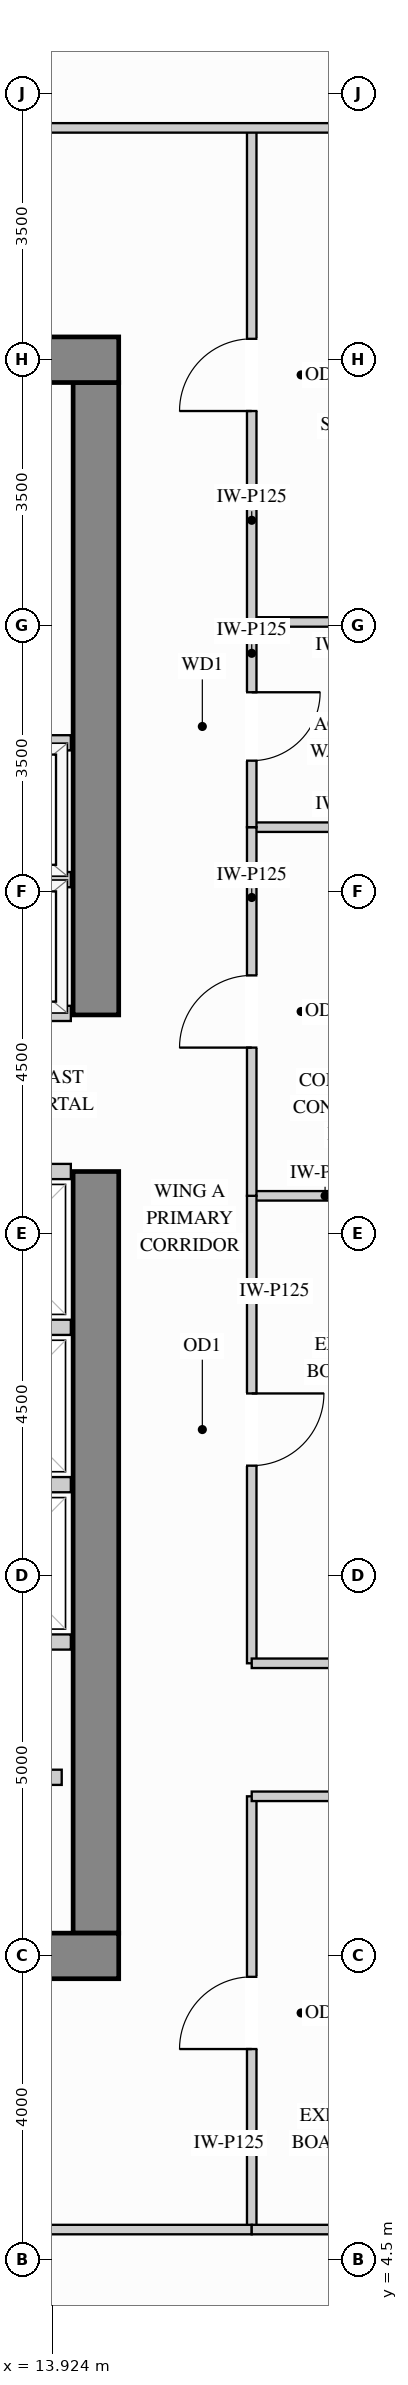
"""IFC4 building model, lengths in metres.
Left out: names, types, materials, properties, quantities, classifications, styles, units other than length and angle.
Written with IfcOpenShell. Run it as: python <this file> out.ifc"""

import sys

from ifc_helpers import new_model, si_unit, direction, frame, frame_2d, origin, place, context, subcontext, project, spatial, rectangle, extrude, source, transform, mapped, element, fill, save


model = new_model("IFC4")
c1 = context("Model", 3, precision=1e-05, world=origin(), true_north=direction((0.0, 1.0)))
c2 = subcontext(c1, "Body", "Model", "MODEL_VIEW")
j1 = project(units=[si_unit("LENGTHUNIT", "METRE"), si_unit("PLANEANGLEUNIT", "RADIAN")], contexts=[c1])
p1 = place(None, origin())
s1 = spatial("IfcSite", under=j1, at=p1, CompositionType="ELEMENT")
p2 = place(p1, origin())
s2 = spatial("IfcBuilding", under=s1, at=p2, CompositionType="ELEMENT")
p3 = place(p2, frame((0.0, 0.0, 153.9)))
s3 = spatial("IfcBuildingStorey", under=s2, at=p3, CompositionType="ELEMENT", Elevation=153.9)
m1 = source(origin(), c2, "Body", "SweptSolid", [
    extrude(rectangle(XDim=10.02, YDim=0.6, at=frame_2d((5.01, 0.0))), origin(), (0.0, 0.0, 1.0), 3.4),
])
p4 = place(p3, frame((14.5, 8.8, 0.0), z_axis=(0.0, 0.0, 1.0), x_axis=(0.0, 1.0, 0.0)))
e1 = element("IfcWall", 1, at=p4, inside=s3, PredefinedType="SHEAR", context=c2, shape_type="MappedRepresentation", body=[
    mapped(m1, transform((0.0, 0.0, 0.0), x_axis=(1.0, 0.0, 0.0), y_axis=(0.0, 1.0, 0.0), z_axis=(0.0, 0.0, 1.0))),
])
m2 = source(origin(), c2, "Body", "SweptSolid", [
    extrude(rectangle(XDim=8.32, YDim=0.6, at=frame_2d((4.16, 0.0))), origin(), (0.0, 0.0, 1.0), 3.4),
])
p5 = place(p3, frame((14.5, 20.88, 0.0), z_axis=(0.0, 0.0, 1.0), x_axis=(0.0, 1.0, 0.0)))
e2 = element("IfcWall", 2, at=p5, inside=s3, PredefinedType="SHEAR", context=c2, shape_type="MappedRepresentation", body=[
    mapped(m2, transform((0.0, 0.0, 0.0), x_axis=(1.0, 0.0, 0.0), y_axis=(0.0, 1.0, 0.0), z_axis=(0.0, 0.0, 1.0))),
])
m3 = source(origin(), c2, "Body", "SweptSolid", [
    extrude(rectangle(XDim=10.6, YDim=0.6, at=frame_2d((5.3, 0.0))), origin(), (0.0, 0.0, 1.0), 3.4),
])
for number, where, z_axis, x_axis in (
    (3, (4.2, 29.5, 0.0), (0.0, 0.0, 1.0), (1.0, 0.0, 0.0)),
    (4, (4.2, 8.5, 0.0), (0.0, 0.0, 1.0), (1.0, 0.0, 0.0)),
):
    element("IfcWall", number, at=place(p3, frame(where, z_axis=z_axis, x_axis=x_axis)), inside=s3, PredefinedType="SHEAR", context=c2, shape_type="MappedRepresentation", body=[
        mapped(m3, transform((0.0, 0.0, 0.0), x_axis=(1.0, 0.0, 0.0), y_axis=(0.0, 1.0, 0.0), z_axis=(0.0, 0.0, 1.0))),
    ])
m4 = source(origin(), c2, "Body", "SweptSolid", [
    extrude(rectangle(XDim=1.93, YDim=0.125, at=frame_2d((0.965, 0.0))), origin(), (0.0, 0.0, 1.0), 3.385),
])
p6 = place(p3, frame((16.55, 18.5, 0.0), z_axis=(0.0, 0.0, 1.0), x_axis=(1.0, 0.0, 0.0)))
e5 = element("IfcWall", 5, at=p6, inside=s3, PredefinedType="PARTITIONING", context=c2, shape_type="MappedRepresentation", body=[
    mapped(m4, transform((0.0, 0.0, 0.0), x_axis=(1.0, 0.0, 0.0), y_axis=(0.0, 1.0, 0.0), z_axis=(0.0, 0.0, 1.0))),
])
m5 = source(origin(), c2, "Body", "SweptSolid", [
    extrude(rectangle(XDim=2.598, YDim=0.125, at=frame_2d((1.299, 0.0))), origin(), (0.0, 0.0, 1.0), 3.385),
])
for number, where, z_axis, x_axis in (
    (6, (16.55, 23.35, 0.0), (0.0, 0.0, 1.0), (1.0, 0.0, 0.0)),
    (7, (16.55, 26.05, 0.0), (0.0, 0.0, 1.0), (1.0, 0.0, 0.0)),
):
    element("IfcWall", number, at=place(p3, frame(where, z_axis=z_axis, x_axis=x_axis)), inside=s3, PredefinedType="PARTITIONING", context=c2, shape_type="MappedRepresentation", body=[
        mapped(m5, transform((0.0, 0.0, 0.0), x_axis=(1.0, 0.0, 0.0), y_axis=(0.0, 1.0, 0.0), z_axis=(0.0, 0.0, 1.0))),
    ])
p7 = place(p3, frame((16.55, 12.35, 0.0), z_axis=(0.0, 0.0, 1.0), x_axis=(0.0, 1.0, 0.0)))
e8 = element("IfcWall", 8, at=p7, inside=s3, PredefinedType="PARTITIONING", context=c2, shape_type="SweptSolid", body=[
    extrude(rectangle(XDim=6.15, YDim=0.125, at=frame_2d((3.075, 0.0))), origin(), (0.0, 0.0, 1.0), 3.385),
])
p8 = place(p7, frame((2.6, 0.0, 0.0)))
e9 = element("IfcOpeningElement", 9, at=p8, cuts=e8, PredefinedType="OPENING", context=c2, shape_type="SweptSolid", body=[
    extrude(rectangle(XDim=0.95, YDim=2.15, at=frame_2d((0.475, 1.075))), frame((0.0, 0.073, 0.0), z_axis=(0.0, -1.0, 0.0), x_axis=(1.0, 0.0, 0.0)), (0.0, 0.0, 1.0), 0.145),
])
p9 = place(p3, frame((16.55, 18.5, 0.0), z_axis=(0.0, 0.0, 1.0), x_axis=(0.0, 1.0, 0.0)))
e10 = element("IfcWall", 10, at=p9, inside=s3, PredefinedType="PARTITIONING", context=c2, shape_type="SweptSolid", body=[
    extrude(rectangle(XDim=4.85, YDim=0.125, at=frame_2d((2.425, 0.0))), origin(), (0.0, 0.0, 1.0), 3.385),
])
p10 = place(p9, frame((1.95, 0.0, 0.0)))
e11 = element("IfcOpeningElement", 11, at=p10, cuts=e10, PredefinedType="OPENING", context=c2, shape_type="SweptSolid", body=[
    extrude(rectangle(XDim=0.95, YDim=2.15, at=frame_2d((0.475, 1.075))), frame((0.0, 0.073, 0.0), z_axis=(0.0, -1.0, 0.0), x_axis=(1.0, 0.0, 0.0)), (0.0, 0.0, 1.0), 0.145),
])
p11 = place(p3, frame((16.55, 26.05, 0.0), z_axis=(0.0, 0.0, 1.0), x_axis=(0.0, 1.0, 0.0)))
e12 = element("IfcWall", 12, at=p11, inside=s3, PredefinedType="PARTITIONING", context=c2, shape_type="SweptSolid", body=[
    extrude(rectangle(XDim=6.5, YDim=0.125, at=frame_2d((3.25, 0.0))), origin(), (0.0, 0.0, 1.0), 3.385),
])
p12 = place(p11, frame((2.775, 0.0, 0.0)))
e13 = element("IfcOpeningElement", 13, at=p12, cuts=e12, PredefinedType="OPENING", context=c2, shape_type="SweptSolid", body=[
    extrude(rectangle(XDim=0.95, YDim=2.15, at=frame_2d((0.475, 1.075))), frame((0.0, 0.073, 0.0), z_axis=(0.0, -1.0, 0.0), x_axis=(1.0, 0.0, 0.0)), (0.0, 0.0, 1.0), 0.145),
])
p13 = place(p3, frame((16.55, 4.9, 0.0), z_axis=(0.0, 0.0, 1.0), x_axis=(0.0, 1.0, 0.0)))
e14 = element("IfcWall", 14, at=p13, inside=s3, PredefinedType="PARTITIONING", context=c2, shape_type="SweptSolid", body=[
    extrude(rectangle(XDim=5.7, YDim=0.125, at=frame_2d((2.85, 0.0))), origin(), (0.0, 0.0, 1.0), 3.385),
])
p14 = place(p13, frame((2.375, 0.0, 0.0)))
e15 = element("IfcOpeningElement", 15, at=p14, cuts=e14, PredefinedType="OPENING", context=c2, shape_type="SweptSolid", body=[
    extrude(rectangle(XDim=0.95, YDim=2.15, at=frame_2d((0.475, 1.075))), frame((0.0, 0.073, 0.0), z_axis=(0.0, -1.0, 0.0), x_axis=(1.0, 0.0, 0.0)), (0.0, 0.0, 1.0), 0.145),
])
p15 = place(p3, frame((16.55, 23.35, 0.0), z_axis=(0.0, 0.0, 1.0), x_axis=(0.0, 1.0, 0.0)))
e16 = element("IfcWall", 16, at=p15, inside=s3, PredefinedType="PARTITIONING", context=c2, shape_type="SweptSolid", body=[
    extrude(rectangle(XDim=2.7, YDim=0.125, at=frame_2d((1.35, 0.0))), origin(), (0.0, 0.0, 1.0), 3.385),
])
p16 = place(p15, frame((0.875, 0.0, 0.0)))
e17 = element("IfcOpeningElement", 17, at=p16, cuts=e16, PredefinedType="OPENING", context=c2, shape_type="SweptSolid", body=[
    extrude(rectangle(XDim=0.9, YDim=2.15, at=frame_2d((0.45, 1.075))), frame((0.0, 0.073, 0.0), z_axis=(0.0, -1.0, 0.0), x_axis=(1.0, 0.0, 0.0)), (0.0, 0.0, 1.0), 0.145),
])
m6 = source(origin(), c2, "Body", "SweptSolid", [
    extrude(rectangle(XDim=7.498, YDim=0.125, at=frame_2d((3.749, 0.0))), origin(), (0.0, 0.0, 1.0), 3.385),
])
p17 = place(p3, frame((11.65, 32.55, 0.0), z_axis=(0.0, 0.0, 1.0), x_axis=(1.0, 0.0, 0.0)))
e18 = element("IfcWall", 18, at=p17, inside=s3, PredefinedType="PARTITIONING", context=c2, shape_type="MappedRepresentation", body=[
    mapped(m6, transform((0.0, 0.0, 0.0), x_axis=(1.0, 0.0, 0.0), y_axis=(0.0, 1.0, 0.0), z_axis=(0.0, 0.0, 1.0))),
])
m7 = source(origin(), c2, "Body", "SweptSolid", [
    extrude(rectangle(XDim=2.95, YDim=0.125, at=frame_2d((1.475, 0.0))), origin(), (0.0, 0.0, 1.0), 3.385),
])
for number, where, z_axis, x_axis in (
    (19, (16.55, 12.35, 0.0), (0.0, 0.0, 1.0), (1.0, 0.0, 0.0)),
    (20, (16.55, 10.6, 0.0), (0.0, 0.0, 1.0), (1.0, 0.0, 0.0)),
):
    element("IfcWall", number, at=place(p3, frame(where, z_axis=z_axis, x_axis=x_axis)), inside=s3, PredefinedType="PARTITIONING", context=c2, shape_type="MappedRepresentation", body=[
        mapped(m7, transform((0.0, 0.0, 0.0), x_axis=(1.0, 0.0, 0.0), y_axis=(0.0, 1.0, 0.0), z_axis=(0.0, 0.0, 1.0))),
    ])
p18 = place(p3, frame((10.213, 4.9, 0.0), z_axis=(0.0, 0.0, 1.0), x_axis=(1.0, 0.0, 0.0)))
e21 = element("IfcWall", 21, at=p18, inside=s3, PredefinedType="PARTITIONING", context=c2, shape_type="SweptSolid", body=[
    extrude(rectangle(XDim=6.337, YDim=0.125, at=frame_2d((3.168, 0.0))), origin(), (0.0, 0.0, 1.0), 2.848),
])
p19 = place(p18, frame((2.694, 0.0, 0.0)))
e22 = element("IfcOpeningElement", 22, at=p19, cuts=e21, PredefinedType="OPENING", context=c2, shape_type="SweptSolid", body=[
    extrude(rectangle(XDim=0.95, YDim=2.15, at=frame_2d((0.475, 1.075))), frame((0.0, 0.073, 0.0), z_axis=(0.0, -1.0, 0.0), x_axis=(1.0, 0.0, 0.0)), (0.0, 0.0, 1.0), 0.145),
])
m8 = source(origin(), c2, "Body", "SweptSolid", [
    extrude(rectangle(XDim=2.598, YDim=0.125, at=frame_2d((1.299, 0.0))), origin(), (0.0, 0.0, 1.0), 2.848),
])
p20 = place(p3, frame((16.55, 4.9, 0.0), z_axis=(0.0, 0.0, 1.0), x_axis=(1.0, 0.0, 0.0)))
e23 = element("IfcWall", 23, at=p20, inside=s3, PredefinedType="PARTITIONING", context=c2, shape_type="MappedRepresentation", body=[
    mapped(m8, transform((0.0, 0.0, 0.0), x_axis=(1.0, 0.0, 0.0), y_axis=(0.0, 1.0, 0.0), z_axis=(0.0, 0.0, 1.0))),
])
m9 = source(origin(), c2, "Body", "SweptSolid", [
    extrude(rectangle(XDim=1.63, YDim=0.2, at=frame_2d((0.815, 0.0))), origin(), (0.0, 0.0, 1.0), 3.385),
])
p21 = place(p3, frame((12.42, 10.85, 0.0), z_axis=(0.0, 0.0, 1.0), x_axis=(1.0, 0.0, 0.0)))
e24 = element("IfcWall", 24, at=p21, inside=s3, PredefinedType="PARTITIONING", context=c2, shape_type="MappedRepresentation", body=[
    mapped(m9, transform((0.0, 0.0, 0.0), x_axis=(1.0, 0.0, 0.0), y_axis=(0.0, 1.0, 0.0), z_axis=(0.0, 0.0, 1.0))),
])
m10 = source(origin(), c2, "Body", "SweptSolid", [
    extrude(rectangle(XDim=2.34, YDim=0.2, at=frame_2d((1.17, 0.0))), origin(), (0.0, 0.0, 1.0), 3.385),
])
for number, where, z_axis, x_axis in (
    (25, (11.83, 22.66, 0.0), (0.0, 0.0, 1.0), (1.0, 0.0, 0.0)),
    (26, (11.83, 20.9, 0.0), (0.0, 0.0, 1.0), (1.0, 0.0, 0.0)),
    (27, (11.83, 24.46, 0.0), (0.0, 0.0, 1.0), (1.0, 0.0, 0.0)),
):
    element("IfcWall", number, at=place(p3, frame(where, z_axis=z_axis, x_axis=x_axis)), inside=s3, PredefinedType="PARTITIONING", context=c2, shape_type="MappedRepresentation", body=[
        mapped(m10, transform((0.0, 0.0, 0.0), x_axis=(1.0, 0.0, 0.0), y_axis=(0.0, 1.0, 0.0), z_axis=(0.0, 0.0, 1.0))),
    ])
m11 = source(origin(), c2, "Body", "SweptSolid", [
    extrude(rectangle(XDim=1.94, YDim=0.2, at=frame_2d((0.97, 0.0))), origin(), (0.0, 0.0, 1.0), 3.385),
])
for number, where, z_axis, x_axis in (
    (28, (12.23, 14.7, 0.0), (0.0, 0.0, 1.0), (1.0, 0.0, 0.0)),
    (29, (12.23, 12.63, 0.0), (0.0, 0.0, 1.0), (1.0, 0.0, 0.0)),
    (30, (12.23, 16.77, 0.0), (0.0, 0.0, 1.0), (1.0, 0.0, 0.0)),
    (31, (12.23, 18.82, 0.0), (0.0, 0.0, 1.0), (1.0, 0.0, 0.0)),
):
    element("IfcWall", number, at=place(p3, frame(where, z_axis=z_axis, x_axis=x_axis)), inside=s3, PredefinedType="PARTITIONING", context=c2, shape_type="MappedRepresentation", body=[
        mapped(m11, transform((0.0, 0.0, 0.0), x_axis=(1.0, 0.0, 0.0), y_axis=(0.0, 1.0, 0.0), z_axis=(0.0, 0.0, 1.0))),
    ])
m12 = source(origin(), c2, "Body", "SweptSolid", [
    extrude(rectangle(XDim=0.95, YDim=2.15, at=frame_2d((0.475, 1.075))), frame((0.0, 0.025, 0.0), z_axis=(0.0, -1.0, 0.0), x_axis=(1.0, 0.0, 0.0)), (0.0, 0.0, 1.0), 0.05),
])
p22 = place(p14, origin())
e32 = element("IfcDoor", 32, at=p22, inside=s3, OperationType="SINGLE_SWING_LEFT", PredefinedType="DOOR", context=c2, shape_type="MappedRepresentation", body=[
    mapped(m12, transform((0.0, 0.0, 0.0), x_axis=(1.0, 0.0, 0.0), y_axis=(0.0, 1.0, 0.0), z_axis=(0.0, 0.0, 1.0))),
])
fill(e15, e32)
p23 = place(p8, origin())
e33 = element("IfcDoor", 33, at=p23, inside=s3, OperationType="SINGLE_SWING_RIGHT", PredefinedType="DOOR", context=c2, shape_type="MappedRepresentation", body=[
    mapped(m12, transform((0.0, 0.0, 0.0), x_axis=(1.0, 0.0, 0.0), y_axis=(0.0, 1.0, 0.0), z_axis=(0.0, 0.0, 1.0))),
])
fill(e9, e33)
p24 = place(p10, origin())
e34 = element("IfcDoor", 34, at=p24, inside=s3, OperationType="SINGLE_SWING_LEFT", PredefinedType="DOOR", context=c2, shape_type="MappedRepresentation", body=[
    mapped(m12, transform((0.0, 0.0, 0.0), x_axis=(1.0, 0.0, 0.0), y_axis=(0.0, 1.0, 0.0), z_axis=(0.0, 0.0, 1.0))),
])
fill(e11, e34)
p25 = place(p12, origin())
e35 = element("IfcDoor", 35, at=p25, inside=s3, OperationType="SINGLE_SWING_LEFT", PredefinedType="DOOR", context=c2, shape_type="MappedRepresentation", body=[
    mapped(m12, transform((0.0, 0.0, 0.0), x_axis=(1.0, 0.0, 0.0), y_axis=(0.0, 1.0, 0.0), z_axis=(0.0, 0.0, 1.0))),
])
fill(e13, e35)
m13 = source(origin(), c2, "Body", "SweptSolid", [
    extrude(rectangle(XDim=0.9, YDim=2.15, at=frame_2d((0.45, 1.075))), frame((0.0, 0.025, 0.0), z_axis=(0.0, -1.0, 0.0), x_axis=(1.0, 0.0, 0.0)), (0.0, 0.0, 1.0), 0.05),
])
p26 = place(p16, origin())
e36 = element("IfcDoor", 36, at=p26, inside=s3, OperationType="SINGLE_SWING_RIGHT", PredefinedType="DOOR", context=c2, shape_type="MappedRepresentation", body=[
    mapped(m13, transform((0.0, 0.0, 0.0), x_axis=(1.0, 0.0, 0.0), y_axis=(0.0, 1.0, 0.0), z_axis=(0.0, 0.0, 1.0))),
])
fill(e17, e36)
save(model, sys.argv[1])
